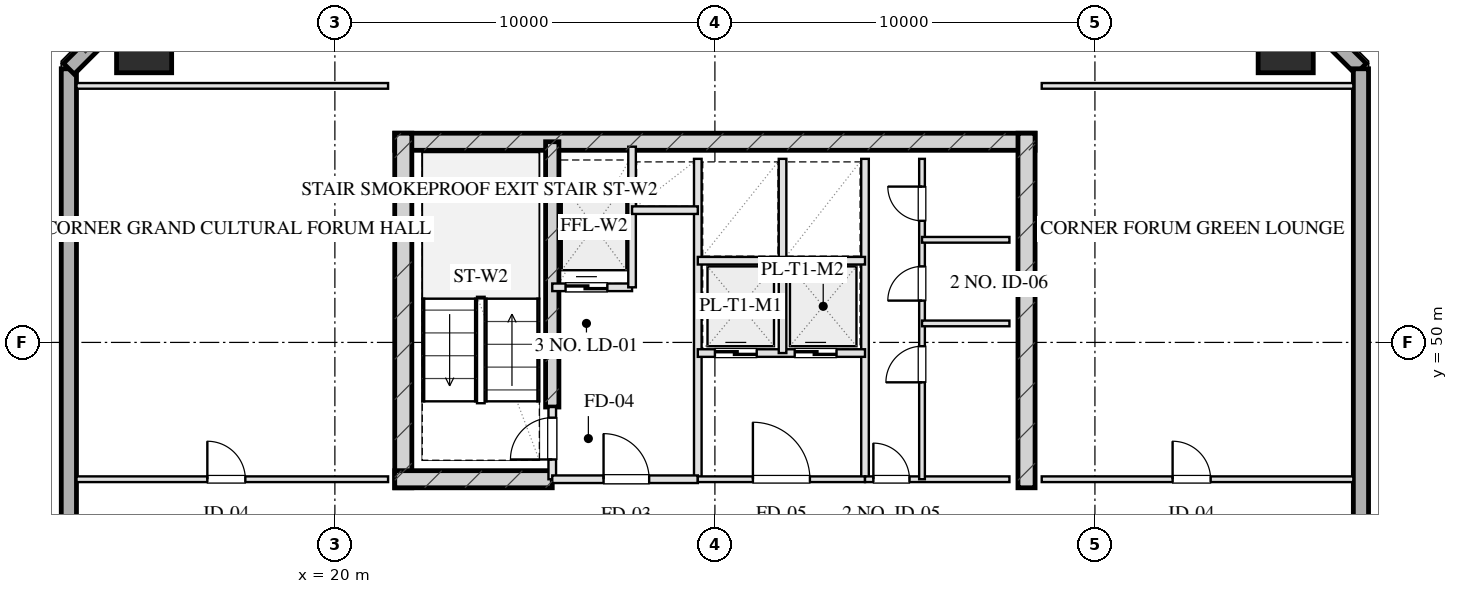
"""IFC4 building model, lengths in metres.
Left out: names, types, materials, properties, quantities, classifications, styles, units other than length and angle.
Written with IfcOpenShell. Run it as: python <this file> out.ifc"""

import sys

from ifc_helpers import new_model, si_unit, direction, frame, frame_2d, origin, origin_2d, place, context, subcontext, project, spatial, rectangle, hollow_rectangle, extrude, element, fill, save


model = new_model("IFC4")
c1 = context("Model", 3, precision=1e-05, world=origin(), true_north=direction((0.0, 1.0)))
c2 = subcontext(c1, "Body", "Model", "MODEL_VIEW")
j1 = project(units=[si_unit("LENGTHUNIT", "METRE"), si_unit("PLANEANGLEUNIT", "RADIAN")], contexts=[c1])
p1 = place(None, origin())
s1 = spatial("IfcSite", under=j1, at=p1, CompositionType="ELEMENT")
p2 = place(p1, origin())
s2 = spatial("IfcBuilding", under=s1, at=p2, CompositionType="ELEMENT")
p3 = place(p2, frame((0.0, 0.0, 202.4)))
s3 = spatial("IfcBuildingStorey", under=s2, at=p3, CompositionType="ELEMENT", Elevation=202.4)
p4 = place(p3, frame((21.575, 55.28, 0.0), z_axis=(0.0, 0.0, 1.0), x_axis=(1.0, 0.0, 0.0)))
e1 = element("IfcWall", 1, at=p4, inside=s3, PredefinedType="SHEAR", context=c2, shape_type="SweptSolid", body=[
    extrude(rectangle(XDim=16.85, YDim=0.45, at=frame_2d((8.425, 0.0))), origin(), (0.0, 0.0, 1.0), 3.45),
])
for number, where, z_axis, x_axis in (
    (2, (21.8, 46.175, 0.0), (0.0, 0.0, 1.0), (0.0, 1.0, 0.0)),
    (3, (38.2, 46.175, 0.0), (0.0, 0.0, 1.0), (0.0, 1.0, 0.0)),
):
    element("IfcWall", number, at=place(p3, frame(where, z_axis=z_axis, x_axis=x_axis)), inside=s3, PredefinedType="SHEAR", context=c2, shape_type="SweptSolid", body=[
        extrude(rectangle(XDim=9.33, YDim=0.45, at=frame_2d((4.665, 0.0))), origin(), (0.0, 0.0, 1.0), 3.45),
    ])
p5 = place(p3, frame((25.72, 48.3, 0.0), z_axis=(0.0, 0.0, 1.0), x_axis=(0.0, 1.0, 0.0)))
e4 = element("IfcWall", 4, at=p5, inside=s3, PredefinedType="SHEAR", context=c2, shape_type="SweptSolid", body=[
    extrude(rectangle(XDim=6.98, YDim=0.35, at=frame_2d((3.49, 0.0))), origin(), (0.0, 0.0, 1.0), 3.45),
])
p6 = place(p3, frame((21.575, 46.4, 0.0), z_axis=(0.0, 0.0, 1.0), x_axis=(1.0, 0.0, 0.0)))
e5 = element("IfcWall", 5, at=p6, inside=s3, PredefinedType="SHEAR", context=c2, shape_type="SweptSolid", body=[
    extrude(rectangle(XDim=4.145, YDim=0.45, at=frame_2d((2.073, 0.0))), origin(), (0.0, 0.0, 1.0), 3.45),
])
for number, where, z_axis, x_axis in (
    (6, (45.02, 57.82, 0.0), (0.0, 0.0, 1.0), (1.0, 0.0, 0.0)),
    (7, (14.98, 57.82, 0.0), (0.0, 0.0, 1.0), (1.0, 0.0, 0.0)),
):
    element("IfcColumn", number, at=place(p3, frame(where, z_axis=z_axis, x_axis=x_axis)), inside=s3, PredefinedType="COLUMN", context=c2, shape_type="SweptSolid", body=[
        extrude(hollow_rectangle(XDim=1.45, YDim=1.45, WallThickness=0.05, at=origin_2d()), origin(), (0.0, 0.0, 1.0), 3.451),
    ])
p7 = place(p3, frame((13.0, 10.8, 0.0), z_axis=(0.0, 0.0, 1.0), x_axis=(0.0, 1.0, 0.0)))
e8 = element("IfcWall", 8, at=p7, inside=s3, PredefinedType="SOLIDWALL", context=c2, shape_type="SweptSolid", body=[
    extrude(rectangle(XDim=46.4, YDim=0.4, at=frame_2d((23.2, 0.0))), origin(), (0.0, 0.0, 1.0), 2.61),
])
p8 = place(p7, frame((15.75, 0.0, 0.75)))
e9 = element("IfcOpeningElement", 9, at=p8, cuts=e8, PredefinedType="OPENING", context=c2, shape_type="SweptSolid", body=[
    extrude(rectangle(XDim=2.1, YDim=1.46, at=frame_2d((1.05, 0.73))), frame((0.0, 0.21, 0.0), z_axis=(0.0, -1.0, 0.0), x_axis=(1.0, 0.0, 0.0)), (0.0, 0.0, 1.0), 0.42),
])
p9 = place(p7, frame((19.55, 0.0, 0.75)))
e10 = element("IfcOpeningElement", 10, at=p9, cuts=e8, PredefinedType="OPENING", context=c2, shape_type="SweptSolid", body=[
    extrude(rectangle(XDim=2.1, YDim=1.46, at=frame_2d((1.05, 0.73))), frame((0.0, 0.21, 0.0), z_axis=(0.0, -1.0, 0.0), x_axis=(1.0, 0.0, 0.0)), (0.0, 0.0, 1.0), 0.42),
])
p10 = place(p7, frame((24.75, 0.0, 0.75)))
e11 = element("IfcOpeningElement", 11, at=p10, cuts=e8, PredefinedType="OPENING", context=c2, shape_type="SweptSolid", body=[
    extrude(rectangle(XDim=2.1, YDim=1.46, at=frame_2d((1.05, 0.73))), frame((0.0, 0.21, 0.0), z_axis=(0.0, -1.0, 0.0), x_axis=(1.0, 0.0, 0.0)), (0.0, 0.0, 1.0), 0.42),
])
p11 = place(p7, frame((28.55, 0.0, 0.75)))
e12 = element("IfcOpeningElement", 12, at=p11, cuts=e8, PredefinedType="OPENING", context=c2, shape_type="SweptSolid", body=[
    extrude(rectangle(XDim=2.1, YDim=1.46, at=frame_2d((1.05, 0.73))), frame((0.0, 0.21, 0.0), z_axis=(0.0, -1.0, 0.0), x_axis=(1.0, 0.0, 0.0)), (0.0, 0.0, 1.0), 0.42),
])
for number, where, z_axis, x_axis in (
    (13, (13.0, 57.2, 0.0), (0.0, 0.0, 1.0), (0.707, 0.707, 0.0)),
    (14, (44.4, 59.8, 0.0), (0.0, 0.0, 1.0), (0.707, -0.707, 0.0)),
):
    element("IfcWall", number, at=place(p3, frame(where, z_axis=z_axis, x_axis=x_axis)), inside=s3, PredefinedType="SOLIDWALL", context=c2, shape_type="SweptSolid", body=[
        extrude(rectangle(XDim=3.677, YDim=0.4, at=frame_2d((1.838, 0.0))), origin(), (0.0, 0.0, 1.0), 2.61),
    ])
p12 = place(p3, frame((47.0, 57.2, 0.0), z_axis=(0.0, 0.0, 1.0), x_axis=(0.0, -1.0, 0.0)))
e15 = element("IfcWall", 15, at=p12, inside=s3, PredefinedType="SOLIDWALL", context=c2, shape_type="SweptSolid", body=[
    extrude(rectangle(XDim=46.4, YDim=0.4, at=frame_2d((23.2, 0.0))), origin(), (0.0, 0.0, 1.0), 2.61),
])
p13 = place(p12, frame((28.55, 0.0, 0.75)))
e16 = element("IfcOpeningElement", 16, at=p13, cuts=e15, PredefinedType="OPENING", context=c2, shape_type="SweptSolid", body=[
    extrude(rectangle(XDim=2.1, YDim=1.46, at=frame_2d((1.05, 0.73))), frame((0.0, 0.21, 0.0), z_axis=(0.0, -1.0, 0.0), x_axis=(1.0, 0.0, 0.0)), (0.0, 0.0, 1.0), 0.42),
])
p14 = place(p12, frame((24.75, 0.0, 0.75)))
e17 = element("IfcOpeningElement", 17, at=p14, cuts=e15, PredefinedType="OPENING", context=c2, shape_type="SweptSolid", body=[
    extrude(rectangle(XDim=2.1, YDim=1.46, at=frame_2d((1.05, 0.73))), frame((0.0, 0.21, 0.0), z_axis=(0.0, -1.0, 0.0), x_axis=(1.0, 0.0, 0.0)), (0.0, 0.0, 1.0), 0.42),
])
p15 = place(p12, frame((19.55, 0.0, 0.75)))
e18 = element("IfcOpeningElement", 18, at=p15, cuts=e15, PredefinedType="OPENING", context=c2, shape_type="SweptSolid", body=[
    extrude(rectangle(XDim=2.1, YDim=1.46, at=frame_2d((1.05, 0.73))), frame((0.0, 0.21, 0.0), z_axis=(0.0, -1.0, 0.0), x_axis=(1.0, 0.0, 0.0)), (0.0, 0.0, 1.0), 0.42),
])
p16 = place(p12, frame((15.75, 0.0, 0.75)))
e19 = element("IfcOpeningElement", 19, at=p16, cuts=e15, PredefinedType="OPENING", context=c2, shape_type="SweptSolid", body=[
    extrude(rectangle(XDim=2.1, YDim=1.46, at=frame_2d((1.05, 0.73))), frame((0.0, 0.21, 0.0), z_axis=(0.0, -1.0, 0.0), x_axis=(1.0, 0.0, 0.0)), (0.0, 0.0, 1.0), 0.42),
])
p17 = place(p3, frame((25.72, 46.4, 0.0), z_axis=(0.0, 0.0, 1.0), x_axis=(0.0, 1.0, 0.0)))
e20 = element("IfcWall", 20, at=p17, inside=s3, PredefinedType="PARTITIONING", context=c2, shape_type="SweptSolid", body=[
    extrude(rectangle(XDim=1.9, YDim=0.2, at=frame_2d((0.95, 0.0))), origin(), (0.0, 0.0, 1.0), 3.175),
])
p18 = place(p17, frame((0.52, 0.0, 0.0)))
e21 = element("IfcOpeningElement", 21, at=p18, cuts=e20, PredefinedType="OPENING", context=c2, shape_type="SweptSolid", body=[
    extrude(rectangle(XDim=1.1, YDim=2.05, at=frame_2d((0.55, 1.025))), frame((0.0, 0.11, 0.0), z_axis=(0.0, -1.0, 0.0), x_axis=(1.0, 0.0, 0.0)), (0.0, 0.0, 1.0), 0.22),
])
p19 = place(p3, frame((29.55, 46.4, 0.0), z_axis=(0.0, 0.0, 1.0), x_axis=(0.0, 1.0, 0.0)))
e22 = element("IfcWall", 22, at=p19, inside=s3, PredefinedType="PARTITIONING", context=c2, shape_type="SweptSolid", body=[
    extrude(rectangle(XDim=8.43, YDim=0.2, at=frame_2d((4.215, 0.0))), origin(), (0.0, 0.0, 1.0), 3.175),
])
p20 = place(p3, frame((25.72, 46.4, 0.0), z_axis=(0.0, 0.0, 1.0), x_axis=(1.0, 0.0, 0.0)))
e23 = element("IfcWall", 23, at=p20, inside=s3, PredefinedType="PARTITIONING", context=c2, shape_type="SweptSolid", body=[
    extrude(rectangle(XDim=3.83, YDim=0.2, at=frame_2d((1.915, 0.0))), origin(), (0.0, 0.0, 1.0), 3.175),
])
p21 = place(p20, frame((1.35, 0.0, 0.0)))
e24 = element("IfcOpeningElement", 24, at=p21, cuts=e23, PredefinedType="OPENING", context=c2, shape_type="SweptSolid", body=[
    extrude(rectangle(XDim=1.2, YDim=2.05, at=frame_2d((0.6, 1.025))), frame((0.0, 0.11, 0.0), z_axis=(0.0, -1.0, 0.0), x_axis=(1.0, 0.0, 0.0)), (0.0, 0.0, 1.0), 0.22),
])
p22 = place(p3, frame((25.72, 51.45, 0.0), z_axis=(0.0, 0.0, 1.0), x_axis=(1.0, 0.0, 0.0)))
e25 = element("IfcWall", 25, at=p22, inside=s3, PredefinedType="PARTITIONING", context=c2, shape_type="SweptSolid", body=[
    extrude(rectangle(XDim=2.1, YDim=0.2, at=frame_2d((1.05, 0.0))), origin(), (0.0, 0.0, 1.0), 3.175),
])
p23 = place(p22, frame((0.35, 0.0, 0.0)))
e26 = element("IfcOpeningElement", 26, at=p23, cuts=e25, PredefinedType="OPENING", context=c2, shape_type="SweptSolid", body=[
    extrude(rectangle(XDim=1.1, YDim=2.05, at=frame_2d((0.55, 1.025))), frame((0.0, 0.11, 0.0), z_axis=(0.0, -1.0, 0.0), x_axis=(1.0, 0.0, 0.0)), (0.0, 0.0, 1.0), 0.22),
])
p24 = place(p3, frame((27.82, 51.45, 0.0), z_axis=(0.0, 0.0, 1.0), x_axis=(0.0, 1.0, 0.0)))
e27 = element("IfcWall", 27, at=p24, inside=s3, PredefinedType="PARTITIONING", context=c2, shape_type="SweptSolid", body=[
    extrude(rectangle(XDim=3.7, YDim=0.2, at=frame_2d((1.85, 0.0))), origin(), (0.0, 0.0, 1.0), 3.175),
])
p25 = place(p3, frame((27.82, 53.48, 0.0), z_axis=(0.0, 0.0, 1.0), x_axis=(1.0, 0.0, 0.0)))
e28 = element("IfcWall", 28, at=p25, inside=s3, PredefinedType="PARTITIONING", context=c2, shape_type="SweptSolid", body=[
    extrude(rectangle(XDim=1.73, YDim=0.2, at=frame_2d((0.865, 0.0))), origin(), (0.0, 0.0, 1.0), 3.175),
])
p26 = place(p3, frame((33.95, 46.4, 0.0), z_axis=(0.0, 0.0, 1.0), x_axis=(0.0, 1.0, 0.0)))
e29 = element("IfcWall", 29, at=p26, inside=s3, PredefinedType="PARTITIONING", context=c2, shape_type="SweptSolid", body=[
    extrude(rectangle(XDim=8.43, YDim=0.2, at=frame_2d((4.215, 0.0))), origin(), (0.0, 0.0, 1.0), 3.175),
])
p27 = place(p3, frame((29.55, 46.4, 0.0), z_axis=(0.0, 0.0, 1.0), x_axis=(1.0, 0.0, 0.0)))
e30 = element("IfcWall", 30, at=p27, inside=s3, PredefinedType="PARTITIONING", context=c2, shape_type="SweptSolid", body=[
    extrude(rectangle(XDim=4.4, YDim=0.15, at=frame_2d((2.2, 0.0))), origin(), (0.0, 0.0, 1.0), 3.175),
])
p28 = place(p27, frame((1.45, 0.0, 0.0)))
e31 = element("IfcOpeningElement", 31, at=p28, cuts=e30, PredefinedType="OPENING", context=c2, shape_type="SweptSolid", body=[
    extrude(rectangle(XDim=1.5, YDim=2.05, at=frame_2d((0.75, 1.025))), frame((0.0, 0.085, 0.0), z_axis=(0.0, -1.0, 0.0), x_axis=(1.0, 0.0, 0.0)), (0.0, 0.0, 1.0), 0.17),
])
p29 = place(p3, frame((29.55, 49.72, 0.0), z_axis=(0.0, 0.0, 1.0), x_axis=(1.0, 0.0, 0.0)))
e32 = element("IfcWall", 32, at=p29, inside=s3, PredefinedType="PARTITIONING", context=c2, shape_type="SweptSolid", body=[
    extrude(rectangle(XDim=4.4, YDim=0.2, at=frame_2d((2.2, 0.0))), origin(), (0.0, 0.0, 1.0), 3.175),
])
p30 = place(p29, frame((0.45, 0.0, 0.0)))
e33 = element("IfcOpeningElement", 33, at=p30, cuts=e32, PredefinedType="OPENING", context=c2, shape_type="SweptSolid", body=[
    extrude(rectangle(XDim=1.1, YDim=2.05, at=frame_2d((0.55, 1.025))), frame((0.0, 0.11, 0.0), z_axis=(0.0, -1.0, 0.0), x_axis=(1.0, 0.0, 0.0)), (0.0, 0.0, 1.0), 0.22),
])
p31 = place(p29, frame((2.55, 0.0, 0.0)))
e34 = element("IfcOpeningElement", 34, at=p31, cuts=e32, PredefinedType="OPENING", context=c2, shape_type="SweptSolid", body=[
    extrude(rectangle(XDim=1.1, YDim=2.05, at=frame_2d((0.55, 1.025))), frame((0.0, 0.11, 0.0), z_axis=(0.0, -1.0, 0.0), x_axis=(1.0, 0.0, 0.0)), (0.0, 0.0, 1.0), 0.22),
])
p32 = place(p3, frame((31.78, 49.72, 0.0), z_axis=(0.0, 0.0, 1.0), x_axis=(0.0, 1.0, 0.0)))
e35 = element("IfcWall", 35, at=p32, inside=s3, PredefinedType="PARTITIONING", context=c2, shape_type="SweptSolid", body=[
    extrude(rectangle(XDim=5.11, YDim=0.2, at=frame_2d((2.555, 0.0))), origin(), (0.0, 0.0, 1.0), 3.175),
])
p33 = place(p3, frame((29.55, 52.15, 0.0), z_axis=(0.0, 0.0, 1.0), x_axis=(1.0, 0.0, 0.0)))
e36 = element("IfcWall", 36, at=p33, inside=s3, PredefinedType="PARTITIONING", context=c2, shape_type="SweptSolid", body=[
    extrude(rectangle(XDim=4.4, YDim=0.2, at=frame_2d((2.2, 0.0))), origin(), (0.0, 0.0, 1.0), 3.175),
])
p34 = place(p3, frame((33.95, 46.4, 0.0), z_axis=(0.0, 0.0, 1.0), x_axis=(1.0, 0.0, 0.0)))
e37 = element("IfcWall", 37, at=p34, inside=s3, PredefinedType="PARTITIONING", context=c2, shape_type="SweptSolid", body=[
    extrude(rectangle(XDim=3.8, YDim=0.15, at=frame_2d((1.9, 0.0))), origin(), (0.0, 0.0, 1.0), 3.175),
])
p35 = place(p34, frame((0.22, 0.0, 0.0)))
e38 = element("IfcOpeningElement", 38, at=p35, cuts=e37, PredefinedType="OPENING", context=c2, shape_type="SweptSolid", body=[
    extrude(rectangle(XDim=0.95, YDim=2.05, at=frame_2d((0.475, 1.025))), frame((0.0, 0.085, 0.0), z_axis=(0.0, -1.0, 0.0), x_axis=(1.0, 0.0, 0.0)), (0.0, 0.0, 1.0), 0.17),
])
p36 = place(p3, frame((35.45, 46.4, 0.0), z_axis=(0.0, 0.0, 1.0), x_axis=(0.0, 1.0, 0.0)))
e39 = element("IfcWall", 39, at=p36, inside=s3, PredefinedType="PARTITIONING", context=c2, shape_type="SweptSolid", body=[
    extrude(rectangle(XDim=8.43, YDim=0.15, at=frame_2d((4.215, 0.0))), origin(), (0.0, 0.0, 1.0), 2.765),
])
p37 = place(p36, frame((2.55, 0.0, 0.0)))
e40 = element("IfcOpeningElement", 40, at=p37, cuts=e39, PredefinedType="OPENING", context=c2, shape_type="SweptSolid", body=[
    extrude(rectangle(XDim=0.95, YDim=2.05, at=frame_2d((0.475, 1.025))), frame((0.0, 0.085, 0.0), z_axis=(0.0, -1.0, 0.0), x_axis=(1.0, 0.0, 0.0)), (0.0, 0.0, 1.0), 0.17),
])
p38 = place(p36, frame((4.7, 0.0, 0.0)))
e41 = element("IfcOpeningElement", 41, at=p38, cuts=e39, PredefinedType="OPENING", context=c2, shape_type="SweptSolid", body=[
    extrude(rectangle(XDim=0.9, YDim=2.05, at=frame_2d((0.45, 1.025))), frame((0.0, 0.085, 0.0), z_axis=(0.0, -1.0, 0.0), x_axis=(1.0, 0.0, 0.0)), (0.0, 0.0, 1.0), 0.17),
])
p39 = place(p36, frame((6.8, 0.0, 0.0)))
e42 = element("IfcOpeningElement", 42, at=p39, cuts=e39, PredefinedType="OPENING", context=c2, shape_type="SweptSolid", body=[
    extrude(rectangle(XDim=0.9, YDim=2.05, at=frame_2d((0.45, 1.025))), frame((0.0, 0.085, 0.0), z_axis=(0.0, -1.0, 0.0), x_axis=(1.0, 0.0, 0.0)), (0.0, 0.0, 1.0), 0.17),
])
for number, where, z_axis, x_axis in (
    (43, (35.45, 50.5, 0.0), (0.0, 0.0, 1.0), (1.0, 0.0, 0.0)),
    (44, (35.45, 52.7, 0.0), (0.0, 0.0, 1.0), (1.0, 0.0, 0.0)),
):
    element("IfcWall", number, at=place(p3, frame(where, z_axis=z_axis, x_axis=x_axis)), inside=s3, PredefinedType="PARTITIONING", context=c2, shape_type="SweptSolid", body=[
        extrude(rectangle(XDim=2.3, YDim=0.15, at=frame_2d((1.15, 0.0))), origin(), (0.0, 0.0, 1.0), 3.175),
    ])
p40 = place(p3, frame((13.2, 56.75, 0.0), z_axis=(0.0, 0.0, 1.0), x_axis=(1.0, 0.0, 0.0)))
e45 = element("IfcWall", 45, at=p40, inside=s3, PredefinedType="PARTITIONING", context=c2, shape_type="SweptSolid", body=[
    extrude(rectangle(XDim=8.2, YDim=0.15, at=frame_2d((4.1, 0.0))), origin(), (0.0, 0.0, 1.0), 3.175),
])
p41 = place(p3, frame((13.2, 46.4, 0.0), z_axis=(0.0, 0.0, 1.0), x_axis=(1.0, 0.0, 0.0)))
e46 = element("IfcWall", 46, at=p41, inside=s3, PredefinedType="PARTITIONING", context=c2, shape_type="SweptSolid", body=[
    extrude(rectangle(XDim=8.2, YDim=0.15, at=frame_2d((4.1, 0.0))), origin(), (0.0, 0.0, 1.0), 3.175),
])
p42 = place(p41, frame((3.444, 0.0, 0.0)))
e47 = element("IfcOpeningElement", 47, at=p42, cuts=e46, PredefinedType="OPENING", context=c2, shape_type="SweptSolid", body=[
    extrude(rectangle(XDim=1.0, YDim=2.05, at=frame_2d((0.5, 1.025))), frame((0.0, 0.085, 0.0), z_axis=(0.0, -1.0, 0.0), x_axis=(1.0, 0.0, 0.0)), (0.0, 0.0, 1.0), 0.17),
])
p43 = place(p3, frame((38.6, 56.75, 0.0), z_axis=(0.0, 0.0, 1.0), x_axis=(1.0, 0.0, 0.0)))
e48 = element("IfcWall", 48, at=p43, inside=s3, PredefinedType="PARTITIONING", context=c2, shape_type="SweptSolid", body=[
    extrude(rectangle(XDim=8.2, YDim=0.15, at=frame_2d((4.1, 0.0))), origin(), (0.0, 0.0, 1.0), 3.175),
])
p44 = place(p3, frame((38.6, 46.4, 0.0), z_axis=(0.0, 0.0, 1.0), x_axis=(1.0, 0.0, 0.0)))
e49 = element("IfcWall", 49, at=p44, inside=s3, PredefinedType="PARTITIONING", context=c2, shape_type="SweptSolid", body=[
    extrude(rectangle(XDim=8.2, YDim=0.15, at=frame_2d((4.1, 0.0))), origin(), (0.0, 0.0, 1.0), 3.175),
])
p45 = place(p44, frame((3.444, 0.0, 0.0)))
e50 = element("IfcOpeningElement", 50, at=p45, cuts=e49, PredefinedType="OPENING", context=c2, shape_type="SweptSolid", body=[
    extrude(rectangle(XDim=1.0, YDim=2.05, at=frame_2d((0.5, 1.025))), frame((0.0, 0.085, 0.0), z_axis=(0.0, -1.0, 0.0), x_axis=(1.0, 0.0, 0.0)), (0.0, 0.0, 1.0), 0.17),
])
p46 = place(p18, origin())
e51 = element("IfcDoor", 51, at=p46, inside=s3, OperationType="SINGLE_SWING_LEFT", PredefinedType="DOOR", context=c2, shape_type="SweptSolid", body=[
    extrude(rectangle(XDim=1.1, YDim=2.05, at=frame_2d((0.55, 1.025))), frame((0.0, 0.025, 0.0), z_axis=(0.0, -1.0, 0.0), x_axis=(1.0, 0.0, 0.0)), (0.0, 0.0, 1.0), 0.05),
])
fill(e21, e51)
p47 = place(p21, origin())
e52 = element("IfcDoor", 52, at=p47, inside=s3, OperationType="SINGLE_SWING_LEFT", PredefinedType="DOOR", context=c2, shape_type="SweptSolid", body=[
    extrude(rectangle(XDim=1.2, YDim=2.05, at=frame_2d((0.6, 1.025))), frame((0.0, 0.025, 0.0), z_axis=(0.0, -1.0, 0.0), x_axis=(1.0, 0.0, 0.0)), (0.0, 0.0, 1.0), 0.05),
])
fill(e24, e52)
p48 = place(p23, origin())
e53 = element("IfcDoor", 53, at=p48, inside=s3, OperationType="DOUBLE_DOOR_SLIDING", PredefinedType="DOOR", context=c2, shape_type="SweptSolid", body=[
    extrude(rectangle(XDim=1.1, YDim=2.05, at=frame_2d((0.55, 1.025))), frame((0.0, 0.025, 0.0), z_axis=(0.0, -1.0, 0.0), x_axis=(1.0, 0.0, 0.0)), (0.0, 0.0, 1.0), 0.05),
])
fill(e26, e53)
p49 = place(p28, origin())
e54 = element("IfcDoor", 54, at=p49, inside=s3, OperationType="SINGLE_SWING_LEFT", PredefinedType="DOOR", context=c2, shape_type="SweptSolid", body=[
    extrude(rectangle(XDim=1.5, YDim=2.05, at=frame_2d((0.75, 1.025))), frame((0.0, 0.025, 0.0), z_axis=(0.0, -1.0, 0.0), x_axis=(1.0, 0.0, 0.0)), (0.0, 0.0, 1.0), 0.05),
])
fill(e31, e54)
p50 = place(p30, origin())
e55 = element("IfcDoor", 55, at=p50, inside=s3, OperationType="DOUBLE_DOOR_SLIDING", PredefinedType="DOOR", context=c2, shape_type="SweptSolid", body=[
    extrude(rectangle(XDim=1.1, YDim=2.05, at=frame_2d((0.55, 1.025))), frame((0.0, 0.025, 0.0), z_axis=(0.0, -1.0, 0.0), x_axis=(1.0, 0.0, 0.0)), (0.0, 0.0, 1.0), 0.05),
])
fill(e33, e55)
p51 = place(p31, origin())
e56 = element("IfcDoor", 56, at=p51, inside=s3, OperationType="DOUBLE_DOOR_SLIDING", PredefinedType="DOOR", context=c2, shape_type="SweptSolid", body=[
    extrude(rectangle(XDim=1.1, YDim=2.05, at=frame_2d((0.55, 1.025))), frame((0.0, 0.025, 0.0), z_axis=(0.0, -1.0, 0.0), x_axis=(1.0, 0.0, 0.0)), (0.0, 0.0, 1.0), 0.05),
])
fill(e34, e56)
p52 = place(p35, origin())
e57 = element("IfcDoor", 57, at=p52, inside=s3, OperationType="SINGLE_SWING_LEFT", PredefinedType="DOOR", context=c2, shape_type="SweptSolid", body=[
    extrude(rectangle(XDim=0.95, YDim=2.05, at=frame_2d((0.475, 1.025))), frame((0.0, 0.025, 0.0), z_axis=(0.0, -1.0, 0.0), x_axis=(1.0, 0.0, 0.0)), (0.0, 0.0, 1.0), 0.05),
])
fill(e38, e57)
p53 = place(p37, origin())
e58 = element("IfcDoor", 58, at=p53, inside=s3, OperationType="SINGLE_SWING_LEFT", PredefinedType="DOOR", context=c2, shape_type="SweptSolid", body=[
    extrude(rectangle(XDim=0.95, YDim=2.05, at=frame_2d((0.475, 1.025))), frame((0.0, 0.025, 0.0), z_axis=(0.0, -1.0, 0.0), x_axis=(1.0, 0.0, 0.0)), (0.0, 0.0, 1.0), 0.05),
])
fill(e40, e58)
p54 = place(p38, origin())
e59 = element("IfcDoor", 59, at=p54, inside=s3, OperationType="SINGLE_SWING_LEFT", PredefinedType="DOOR", context=c2, shape_type="SweptSolid", body=[
    extrude(rectangle(XDim=0.9, YDim=2.05, at=frame_2d((0.45, 1.025))), frame((0.0, 0.025, 0.0), z_axis=(0.0, -1.0, 0.0), x_axis=(1.0, 0.0, 0.0)), (0.0, 0.0, 1.0), 0.05),
])
fill(e41, e59)
p55 = place(p39, origin())
e60 = element("IfcDoor", 60, at=p55, inside=s3, OperationType="SINGLE_SWING_RIGHT", PredefinedType="DOOR", context=c2, shape_type="SweptSolid", body=[
    extrude(rectangle(XDim=0.9, YDim=2.05, at=frame_2d((0.45, 1.025))), frame((0.0, 0.025, 0.0), z_axis=(0.0, -1.0, 0.0), x_axis=(1.0, 0.0, 0.0)), (0.0, 0.0, 1.0), 0.05),
])
fill(e42, e60)
p56 = place(p42, origin())
e61 = element("IfcDoor", 61, at=p56, inside=s3, OperationType="SINGLE_SWING_LEFT", PredefinedType="DOOR", context=c2, shape_type="SweptSolid", body=[
    extrude(rectangle(XDim=1.0, YDim=2.05, at=frame_2d((0.5, 1.025))), frame((0.0, 0.025, 0.0), z_axis=(0.0, -1.0, 0.0), x_axis=(1.0, 0.0, 0.0)), (0.0, 0.0, 1.0), 0.05),
])
fill(e47, e61)
p57 = place(p45, origin())
e62 = element("IfcDoor", 62, at=p57, inside=s3, OperationType="SINGLE_SWING_LEFT", PredefinedType="DOOR", context=c2, shape_type="SweptSolid", body=[
    extrude(rectangle(XDim=1.0, YDim=2.05, at=frame_2d((0.5, 1.025))), frame((0.0, 0.025, 0.0), z_axis=(0.0, -1.0, 0.0), x_axis=(1.0, 0.0, 0.0)), (0.0, 0.0, 1.0), 0.05),
])
fill(e50, e62)
save(model, sys.argv[1])
